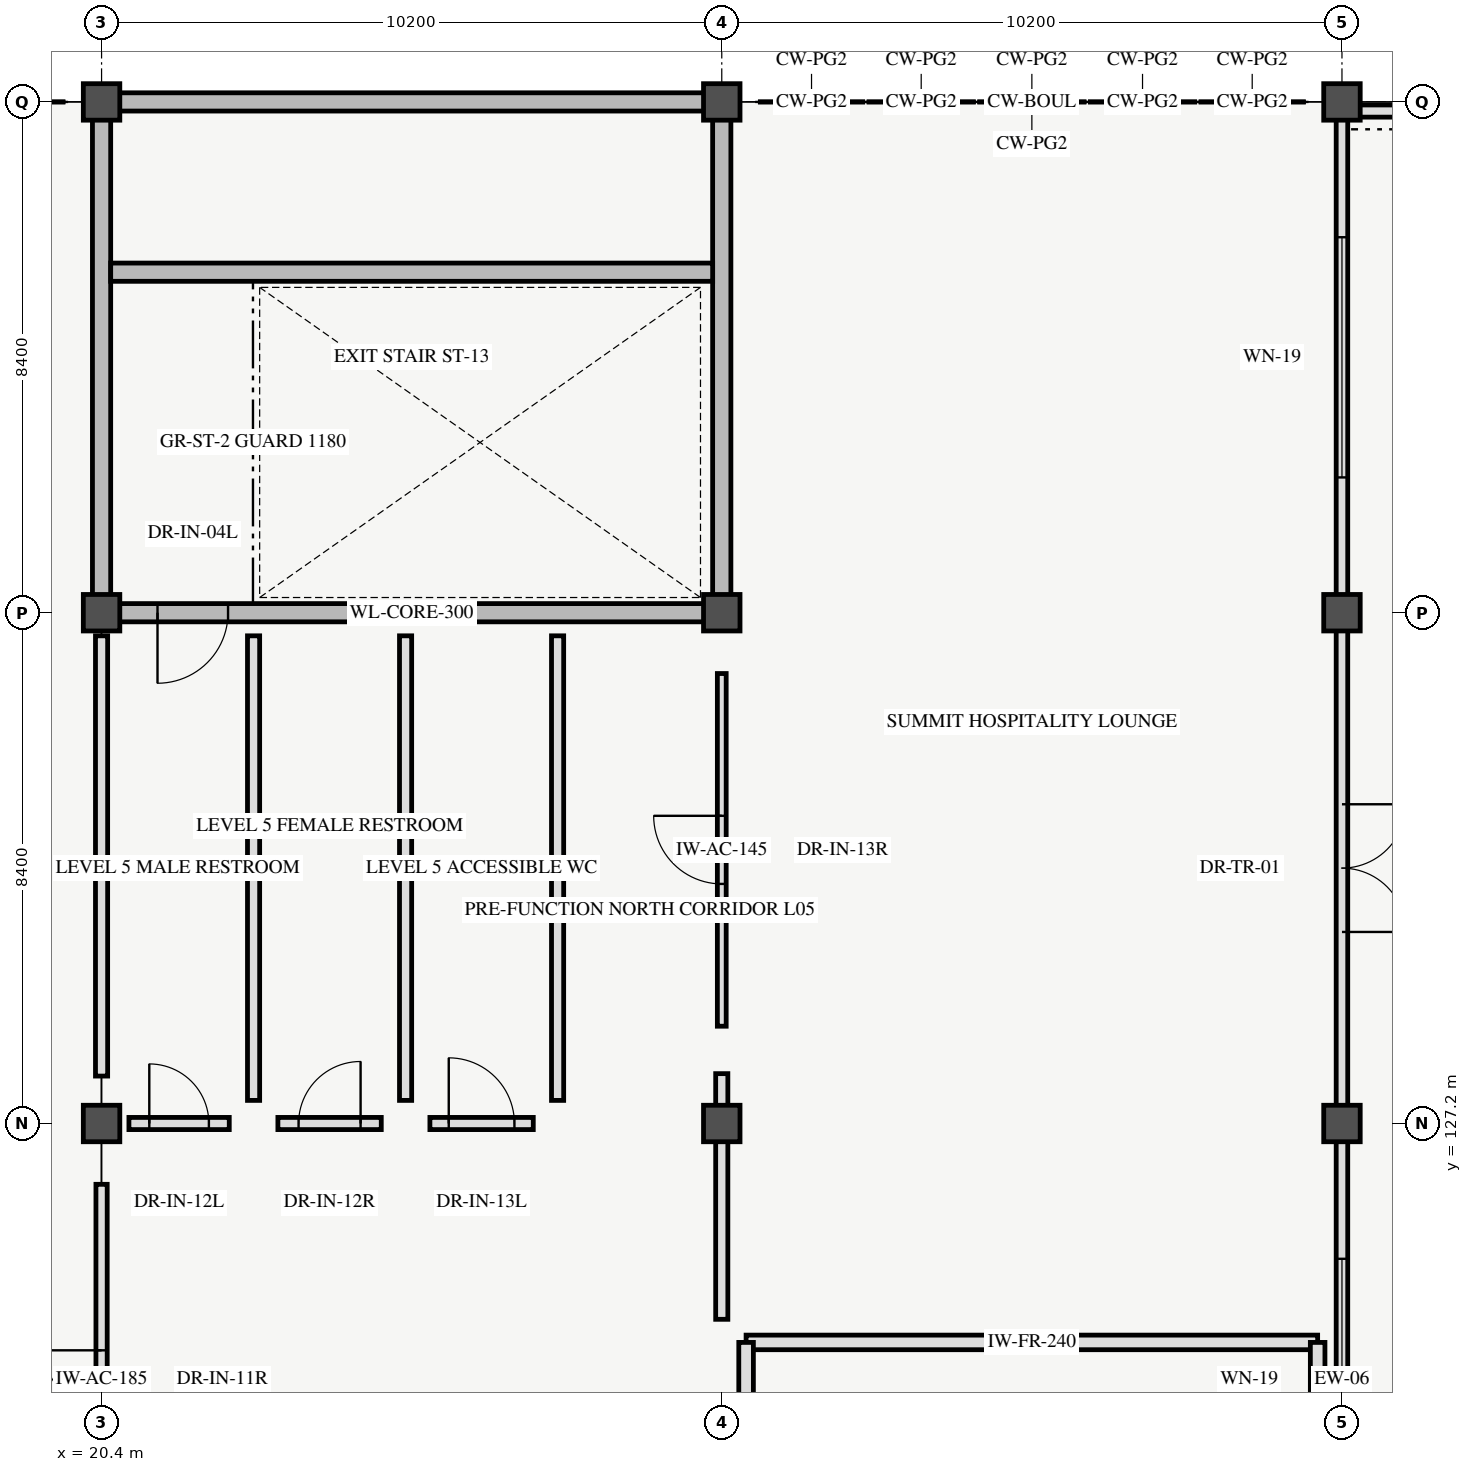
"""IFC4 building model, lengths in metres.
Left out: names, types, materials, properties, quantities, classifications, styles, units other than length and angle.
Written with IfcOpenShell. Run it as: python <this file> out.ifc"""

import sys

from ifc_helpers import new_model, si_unit, direction, frame, frame_2d, origin, origin_2d, place, context, subcontext, project, spatial, rectangle, extrude, element, fill, save


model = new_model("IFC4")
c1 = context("Model", 3, precision=1e-05, world=origin(), true_north=direction((0.0, 1.0)))
c2 = subcontext(c1, "Body", "Model", "MODEL_VIEW")
j1 = project(units=[si_unit("LENGTHUNIT", "METRE"), si_unit("PLANEANGLEUNIT", "RADIAN")], contexts=[c1])
p1 = place(None, origin())
s1 = spatial("IfcSite", under=j1, at=p1, CompositionType="ELEMENT")
p2 = place(p1, origin())
s2 = spatial("IfcBuilding", under=s1, at=p2, CompositionType="ELEMENT")
p3 = place(p2, frame((0.0, 0.0, 23.4)))
s3 = spatial("IfcBuildingStorey", under=s2, at=p3, CompositionType="ELEMENT", Elevation=23.4)
for number, where, z_axis, x_axis in (
    (1, (20.4, 127.2, 0.0), (0.0, 0.0, 1.0), (1.0, 0.0, 0.0)),
    (2, (20.4, 135.6, 0.0), (0.0, 0.0, 1.0), (1.0, 0.0, 0.0)),
    (3, (20.4, 144.0, 0.0), (0.0, 0.0, 1.0), (1.0, 0.0, 0.0)),
    (4, (30.6, 127.2, 0.0), (0.0, 0.0, 1.0), (1.0, 0.0, 0.0)),
    (5, (30.6, 135.6, 0.0), (0.0, 0.0, 1.0), (1.0, 0.0, 0.0)),
    (6, (30.6, 144.0, 0.0), (0.0, 0.0, 1.0), (1.0, 0.0, 0.0)),
    (7, (40.8, 127.2, 0.0), (0.0, 0.0, 1.0), (1.0, 0.0, 0.0)),
    (8, (40.8, 135.6, 0.0), (0.0, 0.0, 1.0), (1.0, 0.0, 0.0)),
    (9, (40.8, 144.0, 0.0), (0.0, 0.0, 1.0), (1.0, 0.0, 0.0)),
):
    element("IfcColumn", number, at=place(p3, frame(where, z_axis=z_axis, x_axis=x_axis)), inside=s3, PredefinedType="COLUMN", context=c2, shape_type="SweptSolid", body=[
        extrude(rectangle(XDim=0.6, YDim=0.6, at=origin_2d()), origin(), (0.0, 0.0, 1.0), 4.2),
    ])
p4 = place(p3, frame((40.8, 119.04, 0.0), z_axis=(0.0, 0.0, 1.0), x_axis=(0.0, 1.0, 0.0)))
e10 = element("IfcWall", 10, at=p4, inside=s3, PredefinedType="STANDARD", context=c2, shape_type="SweptSolid", body=[
    extrude(rectangle(XDim=7.92, YDim=0.19, at=frame_2d((3.96, 0.0))), origin(), (0.0, 0.0, 1.0), 3.06),
])
p5 = place(p4, frame((1.985, 0.0, 0.9)))
e11 = element("IfcOpeningElement", 11, at=p5, cuts=e10, PredefinedType="OPENING", context=c2, shape_type="SweptSolid", body=[
    extrude(rectangle(XDim=3.95, YDim=2.02, at=frame_2d((1.975, 1.01))), frame((0.0, 0.105, 0.0), z_axis=(0.0, -1.0, 0.0), x_axis=(1.0, 0.0, 0.0)), (0.0, 0.0, 1.0), 0.21),
])
p6 = place(p3, frame((40.8, 127.44, 0.0), z_axis=(0.0, 0.0, 1.0), x_axis=(0.0, 1.0, 0.0)))
e12 = element("IfcWall", 12, at=p6, inside=s3, PredefinedType="STANDARD", context=c2, shape_type="SweptSolid", body=[
    extrude(rectangle(XDim=7.92, YDim=0.19, at=frame_2d((3.96, 0.0))), origin(), (0.0, 0.0, 1.0), 3.06),
])
p7 = place(p6, frame((2.91, 0.0, 0.0)))
e13 = element("IfcOpeningElement", 13, at=p7, cuts=e12, PredefinedType="OPENING", context=c2, shape_type="SweptSolid", body=[
    extrude(rectangle(XDim=2.1, YDim=2.3, at=frame_2d((1.05, 1.15))), frame((0.0, 0.105, 0.0), z_axis=(0.0, -1.0, 0.0), x_axis=(1.0, 0.0, 0.0)), (0.0, 0.0, 1.0), 0.21),
])
p8 = place(p3, frame((40.8, 135.84, 0.0), z_axis=(0.0, 0.0, 1.0), x_axis=(0.0, 1.0, 0.0)))
e14 = element("IfcWall", 14, at=p8, inside=s3, PredefinedType="STANDARD", context=c2, shape_type="SweptSolid", body=[
    extrude(rectangle(XDim=7.92, YDim=0.19, at=frame_2d((3.96, 0.0))), origin(), (0.0, 0.0, 1.0), 3.06),
])
p9 = place(p8, frame((1.985, 0.0, 0.9)))
e15 = element("IfcOpeningElement", 15, at=p9, cuts=e14, PredefinedType="OPENING", context=c2, shape_type="SweptSolid", body=[
    extrude(rectangle(XDim=3.95, YDim=2.02, at=frame_2d((1.975, 1.01))), frame((0.0, 0.105, 0.0), z_axis=(0.0, -1.0, 0.0), x_axis=(1.0, 0.0, 0.0)), (0.0, 0.0, 1.0), 0.21),
])
p10 = place(p3, frame((71.25, 143.85, 0.0), z_axis=(0.0, 0.0, 1.0), x_axis=(-1.0, 0.0, 0.0)))
e16 = element("IfcWall", 16, at=p10, inside=s3, PredefinedType="PARAPET", context=c2, shape_type="SweptSolid", body=[
    extrude(rectangle(XDim=30.3, YDim=0.2, at=frame_2d((15.15, 0.0))), origin(), (0.0, 0.0, 1.0), 1.1),
])
p11 = place(p3, frame((20.4, 135.6, 0.0), z_axis=(0.0, 0.0, 1.0), x_axis=(1.0, 0.0, 0.0)))
e17 = element("IfcWall", 17, at=p11, inside=s3, PredefinedType="SHEAR", context=c2, shape_type="SweptSolid", body=[
    extrude(rectangle(XDim=10.2, YDim=0.3, at=frame_2d((5.1, 0.0))), origin(), (0.0, 0.0, 1.0), 4.2),
])
p12 = place(p11, frame((0.92, 0.0, 0.0)))
e18 = element("IfcOpeningElement", 18, at=p12, cuts=e17, PredefinedType="OPENING", context=c2, shape_type="SweptSolid", body=[
    extrude(rectangle(XDim=1.16, YDim=2.2, at=frame_2d((0.58, 1.1))), frame((0.0, 0.16, 0.0), z_axis=(0.0, -1.0, 0.0), x_axis=(1.0, 0.0, 0.0)), (0.0, 0.0, 1.0), 0.32),
])
p13 = place(p3, frame((20.4, 144.0, 0.0), z_axis=(0.0, 0.0, 1.0), x_axis=(1.0, 0.0, 0.0)))
e19 = element("IfcWall", 19, at=p13, inside=s3, PredefinedType="SHEAR", context=c2, shape_type="SweptSolid", body=[
    extrude(rectangle(XDim=10.2, YDim=0.3, at=frame_2d((5.1, 0.0))), origin(), (0.0, 0.0, 1.0), 4.2),
])
for number, where, z_axis, x_axis in (
    (20, (20.4, 135.6, 0.0), (0.0, 0.0, 1.0), (0.0, 1.0, 0.0)),
    (21, (30.6, 135.6, 0.0), (0.0, 0.0, 1.0), (0.0, 1.0, 0.0)),
):
    element("IfcWall", number, at=place(p3, frame(where, z_axis=z_axis, x_axis=x_axis)), inside=s3, PredefinedType="SHEAR", context=c2, shape_type="SweptSolid", body=[
        extrude(rectangle(XDim=8.4, YDim=0.3, at=frame_2d((4.2, 0.0))), origin(), (0.0, 0.0, 1.0), 4.2),
    ])
p14 = place(p3, frame((20.55, 141.2, 0.0), z_axis=(0.0, 0.0, 1.0), x_axis=(1.0, 0.0, 0.0)))
e22 = element("IfcWall", 22, at=p14, inside=s3, PredefinedType="SHEAR", context=c2, shape_type="SweptSolid", body=[
    extrude(rectangle(XDim=9.9, YDim=0.3, at=frame_2d((4.95, 0.0))), origin(), (0.0, 0.0, 1.0), 4.2),
])
p15 = place(p3, frame((31.0, 123.6, 0.0), z_axis=(0.0, 0.0, 1.0), x_axis=(1.0, 0.0, 0.0)))
e23 = element("IfcWall", 23, at=p15, inside=s3, PredefinedType="PARTITIONING", context=c2, shape_type="SweptSolid", body=[
    extrude(rectangle(XDim=9.4, YDim=0.24, at=frame_2d((4.7, 0.0))), origin(), (0.0, 0.0, 1.0), 3.06),
])
p16 = place(p3, frame((40.4, 119.0, 0.0), z_axis=(0.0, 0.0, 1.0), x_axis=(0.0, 1.0, 0.0)))
e24 = element("IfcWall", 24, at=p16, inside=s3, PredefinedType="PARTITIONING", context=c2, shape_type="SweptSolid", body=[
    extrude(rectangle(XDim=4.6, YDim=0.24, at=frame_2d((2.3, 0.0))), origin(), (0.0, 0.0, 1.0), 3.06),
])
p17 = place(p3, frame((31.0, 119.0, 0.0), z_axis=(0.0, 0.0, 1.0), x_axis=(0.0, 1.0, 0.0)))
e25 = element("IfcWall", 25, at=p17, inside=s3, PredefinedType="PARTITIONING", context=c2, shape_type="SweptSolid", body=[
    extrude(rectangle(XDim=4.6, YDim=0.24, at=frame_2d((2.3, 0.0))), origin(), (0.0, 0.0, 1.0), 3.06),
])
p18 = place(p17, frame((1.35, 0.0, 0.0)))
e26 = element("IfcOpeningElement", 26, at=p18, cuts=e25, PredefinedType="OPENING", context=c2, shape_type="SweptSolid", body=[
    extrude(rectangle(XDim=1.9, YDim=2.25, at=frame_2d((0.95, 1.125))), frame((0.0, 0.13, 0.0), z_axis=(0.0, -1.0, 0.0), x_axis=(1.0, 0.0, 0.0)), (0.0, 0.0, 1.0), 0.26),
])
p19 = place(p3, frame((20.4, 119.8, 0.0), z_axis=(0.0, 0.0, 1.0), x_axis=(0.0, 1.0, 0.0)))
e27 = element("IfcWall", 27, at=p19, inside=s3, PredefinedType="PARTITIONING", context=c2, shape_type="SweptSolid", body=[
    extrude(rectangle(XDim=6.4, YDim=0.185, at=frame_2d((3.2, 0.0))), origin(), (0.0, 0.0, 1.0), 3.06),
])
p20 = place(p19, frame((2.73, 0.0, 0.0)))
e28 = element("IfcOpeningElement", 28, at=p20, cuts=e27, PredefinedType="OPENING", context=c2, shape_type="SweptSolid", body=[
    extrude(rectangle(XDim=0.94, YDim=2.08, at=frame_2d((0.47, 1.04))), frame((0.0, 0.103, 0.0), z_axis=(0.0, -1.0, 0.0), x_axis=(1.0, 0.0, 0.0)), (0.0, 0.0, 1.0), 0.205),
])
p21 = place(p3, frame((20.85, 127.2, 0.0), z_axis=(0.0, 0.0, 1.0), x_axis=(1.0, 0.0, 0.0)))
e29 = element("IfcWall", 29, at=p21, inside=s3, PredefinedType="PARTITIONING", context=c2, shape_type="SweptSolid", body=[
    extrude(rectangle(XDim=1.65, YDim=0.2, at=frame_2d((0.825, 0.0))), origin(), (0.0, 0.0, 1.0), 3.06),
])
p22 = place(p21, frame((0.335, 0.0, 0.0)))
e30 = element("IfcOpeningElement", 30, at=p22, cuts=e29, PredefinedType="OPENING", context=c2, shape_type="SweptSolid", body=[
    extrude(rectangle(XDim=0.98, YDim=2.12, at=frame_2d((0.49, 1.06))), frame((0.0, 0.11, 0.0), z_axis=(0.0, -1.0, 0.0), x_axis=(1.0, 0.0, 0.0)), (0.0, 0.0, 1.0), 0.22),
])
p23 = place(p3, frame((23.3, 127.2, 0.0), z_axis=(0.0, 0.0, 1.0), x_axis=(1.0, 0.0, 0.0)))
e31 = element("IfcWall", 31, at=p23, inside=s3, PredefinedType="PARTITIONING", context=c2, shape_type="SweptSolid", body=[
    extrude(rectangle(XDim=1.7, YDim=0.2, at=frame_2d((0.85, 0.0))), origin(), (0.0, 0.0, 1.0), 3.06),
])
p24 = place(p23, frame((0.34, 0.0, 0.0)))
e32 = element("IfcOpeningElement", 32, at=p24, cuts=e31, PredefinedType="OPENING", context=c2, shape_type="SweptSolid", body=[
    extrude(rectangle(XDim=1.02, YDim=2.12, at=frame_2d((0.51, 1.06))), frame((0.0, 0.11, 0.0), z_axis=(0.0, -1.0, 0.0), x_axis=(1.0, 0.0, 0.0)), (0.0, 0.0, 1.0), 0.22),
])
p25 = place(p3, frame((25.8, 127.2, 0.0), z_axis=(0.0, 0.0, 1.0), x_axis=(1.0, 0.0, 0.0)))
e33 = element("IfcWall", 33, at=p25, inside=s3, PredefinedType="PARTITIONING", context=c2, shape_type="SweptSolid", body=[
    extrude(rectangle(XDim=1.7, YDim=0.2, at=frame_2d((0.85, 0.0))), origin(), (0.0, 0.0, 1.0), 3.06),
])
p26 = place(p25, frame((0.31, 0.0, 0.0)))
e34 = element("IfcOpeningElement", 34, at=p26, cuts=e33, PredefinedType="OPENING", context=c2, shape_type="SweptSolid", body=[
    extrude(rectangle(XDim=1.08, YDim=2.18, at=frame_2d((0.54, 1.09))), frame((0.0, 0.11, 0.0), z_axis=(0.0, -1.0, 0.0), x_axis=(1.0, 0.0, 0.0)), (0.0, 0.0, 1.0), 0.22),
])
p27 = place(p3, frame((30.6, 128.8, 0.0), z_axis=(0.0, 0.0, 1.0), x_axis=(0.0, 1.0, 0.0)))
e35 = element("IfcWall", 35, at=p27, inside=s3, PredefinedType="PARTITIONING", context=c2, shape_type="SweptSolid", body=[
    extrude(rectangle(XDim=5.8, YDim=0.145, at=frame_2d((2.9, 0.0))), origin(), (0.0, 0.0, 1.0), 3.06),
])
p28 = place(p27, frame((2.34, 0.0, 0.0)))
e36 = element("IfcOpeningElement", 36, at=p28, cuts=e35, PredefinedType="OPENING", context=c2, shape_type="SweptSolid", body=[
    extrude(rectangle(XDim=1.12, YDim=2.18, at=frame_2d((0.56, 1.09))), frame((0.0, 0.083, 0.0), z_axis=(0.0, -1.0, 0.0), x_axis=(1.0, 0.0, 0.0)), (0.0, 0.0, 1.0), 0.165),
])
p29 = place(p3, frame((20.4, 127.98, 0.0), z_axis=(0.0, 0.0, 1.0), x_axis=(0.0, 1.0, 0.0)))
e37 = element("IfcWall", 37, at=p29, inside=s3, PredefinedType="PARTITIONING", context=c2, shape_type="SweptSolid", body=[
    extrude(rectangle(XDim=7.24, YDim=0.2, at=frame_2d((3.62, 0.0))), origin(), (0.0, 0.0, 1.0), 3.06),
])
for number, where, z_axis, x_axis in (
    (38, (22.9, 127.58, 0.0), (0.0, 0.0, 1.0), (0.0, 1.0, 0.0)),
    (39, (25.4, 127.58, 0.0), (0.0, 0.0, 1.0), (0.0, 1.0, 0.0)),
    (40, (27.9, 127.58, 0.0), (0.0, 0.0, 1.0), (0.0, 1.0, 0.0)),
):
    element("IfcWall", number, at=place(p3, frame(where, z_axis=z_axis, x_axis=x_axis)), inside=s3, PredefinedType="PARTITIONING", context=c2, shape_type="SweptSolid", body=[
        extrude(rectangle(XDim=7.64, YDim=0.2, at=frame_2d((3.82, 0.0))), origin(), (0.0, 0.0, 1.0), 3.06),
    ])
p30 = place(p3, frame((30.6, 123.98, 0.0), z_axis=(0.0, 0.0, 1.0), x_axis=(0.0, 1.0, 0.0)))
e41 = element("IfcWall", 41, at=p30, inside=s3, PredefinedType="PARTITIONING", context=c2, shape_type="SweptSolid", body=[
    extrude(rectangle(XDim=4.04, YDim=0.2, at=frame_2d((2.02, 0.0))), origin(), (0.0, 0.0, 1.0), 3.06),
])
p31 = place(p5, origin())
e42 = element("IfcWindow", 42, at=p31, inside=s3, PartitioningType="TRIPLE_PANEL_VERTICAL", PredefinedType="WINDOW", context=c2, shape_type="SweptSolid", body=[
    extrude(rectangle(XDim=3.95, YDim=2.02, at=frame_2d((1.975, 1.01))), frame((0.0, 0.03, 0.0), z_axis=(0.0, -1.0, 0.0), x_axis=(1.0, 0.0, 0.0)), (0.0, 0.0, 1.0), 0.06),
])
fill(e11, e42)
p32 = place(p7, frame((2.1, 0.0, 0.0), z_axis=(0.0, 0.0, 1.0), x_axis=(-1.0, 0.0, 0.0)))
e43 = element("IfcDoor", 43, at=p32, inside=s3, OperationType="DOUBLE_DOOR_SINGLE_SWING", PredefinedType="DOOR", context=c2, shape_type="SweptSolid", body=[
    extrude(rectangle(XDim=2.1, YDim=2.3, at=frame_2d((1.05, 1.15))), frame((0.0, 0.025, 0.0), z_axis=(0.0, -1.0, 0.0), x_axis=(1.0, 0.0, 0.0)), (0.0, 0.0, 1.0), 0.05),
])
fill(e13, e43)
p33 = place(p9, origin())
e44 = element("IfcWindow", 44, at=p33, inside=s3, PartitioningType="TRIPLE_PANEL_VERTICAL", PredefinedType="WINDOW", context=c2, shape_type="SweptSolid", body=[
    extrude(rectangle(XDim=3.95, YDim=2.02, at=frame_2d((1.975, 1.01))), frame((0.0, 0.03, 0.0), z_axis=(0.0, -1.0, 0.0), x_axis=(1.0, 0.0, 0.0)), (0.0, 0.0, 1.0), 0.06),
])
fill(e15, e44)
p34 = place(p12, origin())
e45 = element("IfcDoor", 45, at=p34, inside=s3, OperationType="SINGLE_SWING_LEFT", PredefinedType="DOOR", context=c2, shape_type="SweptSolid", body=[
    extrude(rectangle(XDim=1.16, YDim=2.2, at=frame_2d((0.58, 1.1))), frame((0.0, 0.025, 0.0), z_axis=(0.0, -1.0, 0.0), x_axis=(1.0, 0.0, 0.0)), (0.0, 0.0, 1.0), 0.05),
])
fill(e18, e45)
p35 = place(p20, origin())
e46 = element("IfcDoor", 46, at=p35, inside=s3, OperationType="SINGLE_SWING_RIGHT", PredefinedType="DOOR", context=c2, shape_type="SweptSolid", body=[
    extrude(rectangle(XDim=0.94, YDim=2.08, at=frame_2d((0.47, 1.04))), frame((0.0, 0.025, 0.0), z_axis=(0.0, -1.0, 0.0), x_axis=(1.0, 0.0, 0.0)), (0.0, 0.0, 1.0), 0.05),
])
fill(e28, e46)
p36 = place(p22, origin())
e47 = element("IfcDoor", 47, at=p36, inside=s3, OperationType="SINGLE_SWING_LEFT", PredefinedType="DOOR", context=c2, shape_type="SweptSolid", body=[
    extrude(rectangle(XDim=0.98, YDim=2.12, at=frame_2d((0.49, 1.06))), frame((0.0, 0.025, 0.0), z_axis=(0.0, -1.0, 0.0), x_axis=(1.0, 0.0, 0.0)), (0.0, 0.0, 1.0), 0.05),
])
fill(e30, e47)
p37 = place(p24, origin())
e48 = element("IfcDoor", 48, at=p37, inside=s3, OperationType="SINGLE_SWING_RIGHT", PredefinedType="DOOR", context=c2, shape_type="SweptSolid", body=[
    extrude(rectangle(XDim=1.02, YDim=2.12, at=frame_2d((0.51, 1.06))), frame((0.0, 0.025, 0.0), z_axis=(0.0, -1.0, 0.0), x_axis=(1.0, 0.0, 0.0)), (0.0, 0.0, 1.0), 0.05),
])
fill(e32, e48)
p38 = place(p26, origin())
e49 = element("IfcDoor", 49, at=p38, inside=s3, OperationType="SINGLE_SWING_LEFT", PredefinedType="DOOR", context=c2, shape_type="SweptSolid", body=[
    extrude(rectangle(XDim=1.08, YDim=2.18, at=frame_2d((0.54, 1.09))), frame((0.0, 0.025, 0.0), z_axis=(0.0, -1.0, 0.0), x_axis=(1.0, 0.0, 0.0)), (0.0, 0.0, 1.0), 0.05),
])
fill(e34, e49)
p39 = place(p28, origin())
e50 = element("IfcDoor", 50, at=p39, inside=s3, OperationType="SINGLE_SWING_RIGHT", PredefinedType="DOOR", context=c2, shape_type="SweptSolid", body=[
    extrude(rectangle(XDim=1.12, YDim=2.18, at=frame_2d((0.56, 1.09))), frame((0.0, 0.025, 0.0), z_axis=(0.0, -1.0, 0.0), x_axis=(1.0, 0.0, 0.0)), (0.0, 0.0, 1.0), 0.05),
])
fill(e36, e50)
save(model, sys.argv[1])
